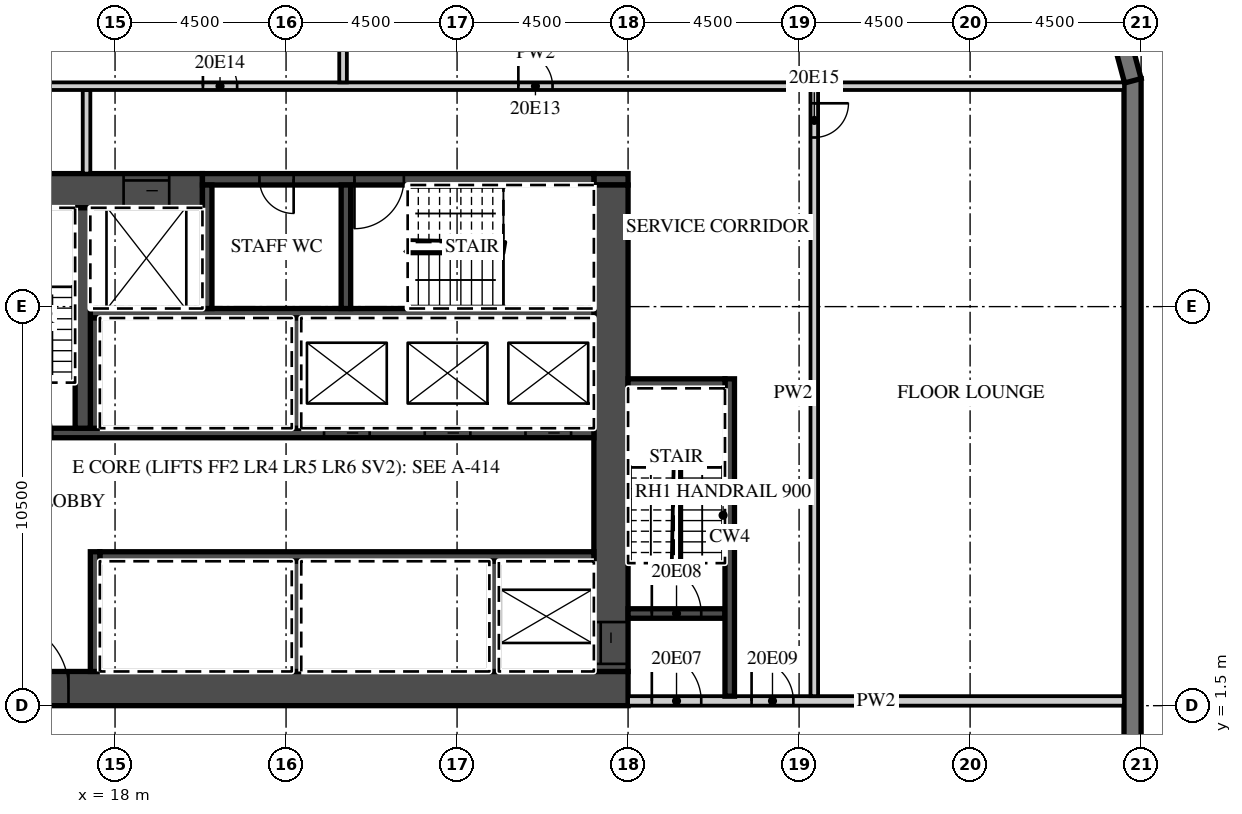
"""IFC4 building model, lengths in metres.
Left out: names, types, materials, properties, quantities, classifications, styles, units other than length and angle.
Written with IfcOpenShell. Run it as: python <this file> out.ifc"""

import sys

from ifc_helpers import new_model, si_unit, direction, frame, frame_2d, origin, place, context, subcontext, project, spatial, polyline, rectangle, outline, extrude, element, fill, save


model = new_model("IFC4")
c1 = context("Model", 3, precision=1e-05, world=origin(), true_north=direction((0.0, 1.0)))
c2 = subcontext(c1, "Body", "Model", "MODEL_VIEW")
j1 = project(units=[si_unit("LENGTHUNIT", "METRE"), si_unit("PLANEANGLEUNIT", "RADIAN")], contexts=[c1])
p1 = place(None, origin())
s1 = spatial("IfcSite", under=j1, at=p1, CompositionType="ELEMENT")
p2 = place(p1, origin())
s2 = spatial("IfcBuilding", under=s1, at=p2, CompositionType="ELEMENT")
p3 = place(p2, frame((0.0, 0.0, 96.3)))
s3 = spatial("IfcBuildingStorey", under=s2, at=p3, CompositionType="ELEMENT", Elevation=96.3)
p4 = place(p3, frame((44.775, -18.0, 0.0), z_axis=(0.0, 0.0, 1.0), x_axis=(0.0, 1.0, 0.0)))
e1 = element("IfcWall", 1, at=p4, inside=s3, PredefinedType="SOLIDWALL", context=c2, shape_type="SweptSolid", body=[
    extrude(rectangle(XDim=36.0, YDim=0.45, at=frame_2d((18.0, 0.0))), origin(), (0.0, 0.0, 1.0), 3.0),
])
p5 = place(p4, frame((3.9, 0.0, 0.45)))
e2 = element("IfcOpeningElement", 2, at=p5, cuts=e1, PredefinedType="OPENING", context=c2, shape_type="SweptSolid", body=[
    extrude(rectangle(XDim=3.3, YDim=2.25, at=frame_2d((1.65, 1.125))), frame((0.0, 0.235, 0.0), z_axis=(0.0, -1.0, 0.0), x_axis=(1.0, 0.0, 0.0)), (0.0, 0.0, 1.0), 0.47),
])
p6 = place(p4, frame((8.4, 0.0, 0.45)))
e3 = element("IfcOpeningElement", 3, at=p6, cuts=e1, PredefinedType="OPENING", context=c2, shape_type="SweptSolid", body=[
    extrude(rectangle(XDim=3.3, YDim=2.25, at=frame_2d((1.65, 1.125))), frame((0.0, 0.235, 0.0), z_axis=(0.0, -1.0, 0.0), x_axis=(1.0, 0.0, 0.0)), (0.0, 0.0, 1.0), 0.47),
])
p7 = place(p4, frame((12.9, 0.0, 0.45)))
e4 = element("IfcOpeningElement", 4, at=p7, cuts=e1, PredefinedType="OPENING", context=c2, shape_type="SweptSolid", body=[
    extrude(rectangle(XDim=3.3, YDim=2.25, at=frame_2d((1.65, 1.125))), frame((0.0, 0.235, 0.0), z_axis=(0.0, -1.0, 0.0), x_axis=(1.0, 0.0, 0.0)), (0.0, 0.0, 1.0), 0.47),
])
p8 = place(p3, frame((44.783, 17.942, 0.0), z_axis=(0.0, 0.0, 1.0), x_axis=(-0.25881466832, 0.965926999034, 0.0)))
e5 = element("IfcWall", 5, at=p8, inside=s3, PredefinedType="SOLIDWALL", context=c2, shape_type="SweptSolid", body=[
    extrude(outline(polyline([(0.0, -0.225), (2.071, -0.225), (1.95, 0.225), (0.121, 0.225), (0.0, -0.225)])), origin(), (0.0, 0.0, 1.0), 3.0),
])
p9 = place(p3, frame((13.5, 1.95, 0.0), z_axis=(0.0, 0.0, 1.0), x_axis=(1.0, 0.0, 0.0)))
e6 = element("IfcWall", 6, at=p9, inside=s3, PredefinedType="SHEAR", context=c2, shape_type="SweptSolid", body=[
    extrude(rectangle(XDim=18.0, YDim=0.9, at=frame_2d((9.0, 0.0))), origin(), (0.0, 0.0, 1.0), 3.0),
])
p10 = place(p9, frame((1.475, 0.0, 0.0)))
e7 = element("IfcOpeningElement", 7, at=p10, cuts=e6, PredefinedType="OPENING", context=c2, shape_type="SweptSolid", body=[
    extrude(rectangle(XDim=1.8, YDim=2.1, at=frame_2d((0.9, 1.05))), frame((0.0, 0.46, 0.0), z_axis=(0.0, -1.0, 0.0), x_axis=(1.0, 0.0, 0.0)), (0.0, 0.0, 1.0), 0.92),
])
p11 = place(p3, frame((13.5, 15.05, 0.0), z_axis=(0.0, 0.0, 1.0), x_axis=(1.0, 0.0, 0.0)))
e8 = element("IfcWall", 8, at=p11, inside=s3, PredefinedType="SHEAR", context=c2, shape_type="SweptSolid", body=[
    extrude(rectangle(XDim=6.8, YDim=0.9, at=frame_2d((3.4, 0.0))), origin(), (0.0, 0.0, 1.0), 3.0),
])
p12 = place(p11, frame((4.725, 0.0, 0.0)))
e9 = element("IfcOpeningElement", 9, at=p12, cuts=e8, PredefinedType="OPENING", context=c2, shape_type="SweptSolid", body=[
    extrude(rectangle(XDim=1.2, YDim=2.1, at=frame_2d((0.6, 1.05))), frame((0.0, 0.46, 0.0), z_axis=(0.0, -1.0, 0.0), x_axis=(1.0, 0.0, 0.0)), (0.0, 0.0, 1.0), 0.92),
])
p13 = place(p3, frame((30.6, 15.35, 0.0), z_axis=(0.0, 0.0, 1.0), x_axis=(1.0, 0.0, 0.0)))
e10 = element("IfcWall", 10, at=p13, inside=s3, PredefinedType="SHEAR", context=c2, shape_type="SweptSolid", body=[
    extrude(rectangle(XDim=0.9, YDim=0.3, at=frame_2d((0.45, 0.0))), origin(), (0.0, 0.0, 1.0), 3.0),
])
p14 = place(p3, frame((20.3, 15.35, 0.0), z_axis=(0.0, 0.0, 1.0), x_axis=(1.0, 0.0, 0.0)))
e11 = element("IfcWall", 11, at=p14, inside=s3, PredefinedType="SHEAR", context=c2, shape_type="SweptSolid", body=[
    extrude(rectangle(XDim=10.3, YDim=0.3, at=frame_2d((5.15, 0.0))), origin(), (0.0, 0.0, 1.0), 3.0),
])
p15 = place(p14, frame((4.0, 0.0, 0.0)))
e12 = element("IfcOpeningElement", 12, at=p15, cuts=e11, PredefinedType="OPENING", context=c2, shape_type="SweptSolid", body=[
    extrude(rectangle(XDim=1.3, YDim=2.1, at=frame_2d((0.65, 1.05))), frame((0.0, 0.16, 0.0), z_axis=(0.0, -1.0, 0.0), x_axis=(1.0, 0.0, 0.0)), (0.0, 0.0, 1.0), 0.32),
])
p16 = place(p14, frame((1.5, 0.0, 0.0)))
e13 = element("IfcOpeningElement", 13, at=p16, cuts=e11, PredefinedType="OPENING", context=c2, shape_type="SweptSolid", body=[
    extrude(rectangle(XDim=0.9, YDim=2.1, at=frame_2d((0.45, 1.05))), frame((0.0, 0.16, 0.0), z_axis=(0.0, -1.0, 0.0), x_axis=(1.0, 0.0, 0.0)), (0.0, 0.0, 1.0), 0.32),
])
p17 = place(p3, frame((31.05, 2.4, 0.0), z_axis=(0.0, 0.0, 1.0), x_axis=(0.0, 1.0, 0.0)))
e14 = element("IfcWall", 14, at=p17, inside=s3, PredefinedType="SHEAR", context=c2, shape_type="SweptSolid", body=[
    extrude(rectangle(XDim=12.8, YDim=0.9, at=frame_2d((6.4, 0.0))), origin(), (0.0, 0.0, 1.0), 3.0),
])
p18 = place(p17, frame((0.2, 0.0, 0.0)))
e15 = element("IfcOpeningElement", 15, at=p18, cuts=e14, PredefinedType="OPENING", context=c2, shape_type="SweptSolid", body=[
    extrude(rectangle(XDim=1.1, YDim=2.1, at=frame_2d((0.55, 1.05))), frame((0.0, 0.46, 0.0), z_axis=(0.0, -1.0, 0.0), x_axis=(1.0, 0.0, 0.0)), (0.0, 0.0, 1.0), 0.92),
])
p19 = place(p3, frame((17.6, 5.425, 0.0), z_axis=(0.0, 0.0, 1.0), x_axis=(1.0, 0.0, 0.0)))
e16 = element("IfcWall", 16, at=p19, inside=s3, PredefinedType="SHEAR", context=c2, shape_type="SweptSolid", body=[
    extrude(rectangle(XDim=13.0, YDim=0.25, at=frame_2d((6.5, 0.0))), origin(), (0.0, 0.0, 1.0), 3.0),
])
p20 = place(p3, frame((17.475, 2.4, 0.0), z_axis=(0.0, 0.0, 1.0), x_axis=(0.0, 1.0, 0.0)))
e17 = element("IfcWall", 17, at=p20, inside=s3, PredefinedType="SHEAR", context=c2, shape_type="SweptSolid", body=[
    extrude(rectangle(XDim=3.15, YDim=0.25, at=frame_2d((1.575, 0.0))), origin(), (0.0, 0.0, 1.0), 3.0),
])
for number, where, z_axis, x_axis in (
    (18, (27.975, 2.4, 0.0), (0.0, 0.0, 1.0), (0.0, 1.0, 0.0)),
    (19, (22.775, 2.4, 0.0), (0.0, 0.0, 1.0), (0.0, 1.0, 0.0)),
):
    element("IfcWall", number, at=place(p3, frame(where, z_axis=z_axis, x_axis=x_axis)), inside=s3, PredefinedType="SHEAR", context=c2, shape_type="SweptSolid", body=[
        extrude(rectangle(XDim=2.9, YDim=0.25, at=frame_2d((1.45, 0.0))), origin(), (0.0, 0.0, 1.0), 3.0),
    ])
p21 = place(p3, frame((14.4, 8.675, 0.0), z_axis=(0.0, 0.0, 1.0), x_axis=(1.0, 0.0, 0.0)))
e20 = element("IfcWall", 20, at=p21, inside=s3, PredefinedType="SHEAR", context=c2, shape_type="SweptSolid", body=[
    extrude(rectangle(XDim=16.2, YDim=0.25, at=frame_2d((8.1, 0.0))), origin(), (0.0, 0.0, 1.0), 3.0),
])
p22 = place(p21, frame((14.4, 0.0, 0.0)))
e21 = element("IfcOpeningElement", 21, at=p22, cuts=e20, PredefinedType="OPENING", context=c2, shape_type="SweptSolid", body=[
    extrude(rectangle(XDim=1.2, YDim=2.1, at=frame_2d((0.6, 1.05))), frame((0.0, 0.135, 0.0), z_axis=(0.0, -1.0, 0.0), x_axis=(1.0, 0.0, 0.0)), (0.0, 0.0, 1.0), 0.27),
])
p23 = place(p21, frame((11.75, 0.0, 0.0)))
e22 = element("IfcOpeningElement", 22, at=p23, cuts=e20, PredefinedType="OPENING", context=c2, shape_type="SweptSolid", body=[
    extrude(rectangle(XDim=1.2, YDim=2.1, at=frame_2d((0.6, 1.05))), frame((0.0, 0.135, 0.0), z_axis=(0.0, -1.0, 0.0), x_axis=(1.0, 0.0, 0.0)), (0.0, 0.0, 1.0), 0.27),
])
p24 = place(p21, frame((9.1, 0.0, 0.0)))
e23 = element("IfcOpeningElement", 23, at=p24, cuts=e20, PredefinedType="OPENING", context=c2, shape_type="SweptSolid", body=[
    extrude(rectangle(XDim=1.2, YDim=2.1, at=frame_2d((0.6, 1.05))), frame((0.0, 0.135, 0.0), z_axis=(0.0, -1.0, 0.0), x_axis=(1.0, 0.0, 0.0)), (0.0, 0.0, 1.0), 0.27),
])
p25 = place(p21, frame((0.65, 0.0, 0.0)))
e24 = element("IfcOpeningElement", 24, at=p25, cuts=e20, PredefinedType="OPENING", context=c2, shape_type="SweptSolid", body=[
    extrude(rectangle(XDim=1.3, YDim=2.1, at=frame_2d((0.65, 1.05))), frame((0.0, 0.135, 0.0), z_axis=(0.0, -1.0, 0.0), x_axis=(1.0, 0.0, 0.0)), (0.0, 0.0, 1.0), 0.27),
])
p26 = place(p3, frame((17.35, 11.825, 0.0), z_axis=(0.0, 0.0, 1.0), x_axis=(1.0, 0.0, 0.0)))
e25 = element("IfcWall", 25, at=p26, inside=s3, PredefinedType="SHEAR", context=c2, shape_type="SweptSolid", body=[
    extrude(rectangle(XDim=13.25, YDim=0.25, at=frame_2d((6.625, 0.0))), origin(), (0.0, 0.0, 1.0), 3.0),
])
for number, where, z_axis, x_axis in (
    (26, (17.475, 8.8, 0.0), (0.0, 0.0, 1.0), (0.0, 1.0, 0.0)),
    (27, (22.775, 8.8, 0.0), (0.0, 0.0, 1.0), (0.0, 1.0, 0.0)),
):
    element("IfcWall", number, at=place(p3, frame(where, z_axis=z_axis, x_axis=x_axis)), inside=s3, PredefinedType="SHEAR", context=c2, shape_type="SweptSolid", body=[
        extrude(rectangle(XDim=2.9, YDim=0.25, at=frame_2d((1.45, 0.0))), origin(), (0.0, 0.0, 1.0), 3.0),
    ])
p27 = place(p3, frame((17.15, 8.8, 0.0), z_axis=(0.0, 0.0, 1.0), x_axis=(0.0, 1.0, 0.0)))
e28 = element("IfcWall", 28, at=p27, inside=s3, PredefinedType="SHEAR", context=c2, shape_type="SweptSolid", body=[
    extrude(rectangle(XDim=5.8, YDim=0.4, at=frame_2d((2.9, 0.0))), origin(), (0.0, 0.0, 1.0), 3.0),
])
for number, where, z_axis, x_axis in (
    (29, (20.425, 11.95, 0.0), (0.0, 0.0, 1.0), (0.0, 1.0, 0.0)),
    (30, (24.075, 11.95, 0.0), (0.0, 0.0, 1.0), (0.0, 1.0, 0.0)),
):
    element("IfcWall", number, at=place(p3, frame(where, z_axis=z_axis, x_axis=x_axis)), inside=s3, PredefinedType="SHEAR", context=c2, shape_type="SweptSolid", body=[
        extrude(rectangle(XDim=3.25, YDim=0.25, at=frame_2d((1.625, 0.0))), origin(), (0.0, 0.0, 1.0), 3.0),
    ])
p28 = place(p3, frame((31.5, 1.625, 0.0), z_axis=(0.0, 0.0, 1.0), x_axis=(1.0, 0.0, 0.0)))
e31 = element("IfcWall", 31, at=p28, inside=s3, PredefinedType="PARTITIONING", context=c2, shape_type="SweptSolid", body=[
    extrude(rectangle(XDim=13.05, YDim=0.25, at=frame_2d((6.525, 0.0))), origin(), (0.0, 0.0, 1.0), 3.0),
])
p29 = place(p28, frame((0.625, 0.0, 0.0)))
e32 = element("IfcOpeningElement", 32, at=p29, cuts=e31, PredefinedType="OPENING", context=c2, shape_type="SweptSolid", body=[
    extrude(rectangle(XDim=1.3, YDim=2.1, at=frame_2d((0.65, 1.05))), frame((0.0, 0.135, 0.0), z_axis=(0.0, -1.0, 0.0), x_axis=(1.0, 0.0, 0.0)), (0.0, 0.0, 1.0), 0.27),
])
p30 = place(p28, frame((3.25, 0.0, 0.0)))
e33 = element("IfcOpeningElement", 33, at=p30, cuts=e31, PredefinedType="OPENING", context=c2, shape_type="SweptSolid", body=[
    extrude(rectangle(XDim=1.1, YDim=2.1, at=frame_2d((0.55, 1.05))), frame((0.0, 0.135, 0.0), z_axis=(0.0, -1.0, 0.0), x_axis=(1.0, 0.0, 0.0)), (0.0, 0.0, 1.0), 0.27),
])
p31 = place(p3, frame((31.5, 3.925, 0.0), z_axis=(0.0, 0.0, 1.0), x_axis=(1.0, 0.0, 0.0)))
e34 = element("IfcWall", 34, at=p31, inside=s3, PredefinedType="SHEAR", context=c2, shape_type="SweptSolid", body=[
    extrude(rectangle(XDim=2.55, YDim=0.25, at=frame_2d((1.275, 0.0))), origin(), (0.0, 0.0, 1.0), 3.0),
])
p32 = place(p31, frame((0.625, 0.0, 0.0)))
e35 = element("IfcOpeningElement", 35, at=p32, cuts=e34, PredefinedType="OPENING", context=c2, shape_type="SweptSolid", body=[
    extrude(rectangle(XDim=1.3, YDim=2.1, at=frame_2d((0.65, 1.05))), frame((0.0, 0.135, 0.0), z_axis=(0.0, -1.0, 0.0), x_axis=(1.0, 0.0, 0.0)), (0.0, 0.0, 1.0), 0.27),
])
p33 = place(p3, frame((34.175, 1.75, 0.0), z_axis=(0.0, 0.0, 1.0), x_axis=(0.0, 1.0, 0.0)))
e36 = element("IfcWall", 36, at=p33, inside=s3, PredefinedType="SHEAR", context=c2, shape_type="SweptSolid", body=[
    extrude(rectangle(XDim=8.35, YDim=0.25, at=frame_2d((4.175, 0.0))), origin(), (0.0, 0.0, 1.0), 3.0),
])
p34 = place(p3, frame((31.5, 9.975, 0.0), z_axis=(0.0, 0.0, 1.0), x_axis=(1.0, 0.0, 0.0)))
e37 = element("IfcWall", 37, at=p34, inside=s3, PredefinedType="SHEAR", context=c2, shape_type="SweptSolid", body=[
    extrude(rectangle(XDim=2.55, YDim=0.25, at=frame_2d((1.275, 0.0))), origin(), (0.0, 0.0, 1.0), 3.0),
])
p35 = place(p3, frame((17.25, 15.5, 0.0), z_axis=(0.0, 0.0, 1.0), x_axis=(0.0, 1.0, 0.0)))
e38 = element("IfcWall", 38, at=p35, inside=s3, PredefinedType="PARTITIONING", context=c2, shape_type="SweptSolid", body=[
    extrude(rectangle(XDim=2.2, YDim=0.2, at=frame_2d((1.1, 0.0))), origin(), (0.0, 0.0, 1.0), 3.0),
])
p36 = place(p3, frame((36.4, 1.75, 0.0), z_axis=(0.0, 0.0, 1.0), x_axis=(0.0, 1.0, 0.0)))
e39 = element("IfcWall", 39, at=p36, inside=s3, PredefinedType="PARTITIONING", context=c2, shape_type="SweptSolid", body=[
    extrude(rectangle(XDim=15.95, YDim=0.2, at=frame_2d((7.975, 0.0))), origin(), (0.0, 0.0, 1.0), 3.0),
])
p37 = place(p36, frame((14.7, 0.0, 0.0)))
e40 = element("IfcOpeningElement", 40, at=p37, cuts=e39, PredefinedType="OPENING", context=c2, shape_type="SweptSolid", body=[
    extrude(rectangle(XDim=0.9, YDim=2.1, at=frame_2d((0.45, 1.05))), frame((0.0, 0.11, 0.0), z_axis=(0.0, -1.0, 0.0), x_axis=(1.0, 0.0, 0.0)), (0.0, 0.0, 1.0), 0.22),
])
p38 = place(p3, frame((13.6, 17.8, 0.0), z_axis=(0.0, 0.0, 1.0), x_axis=(1.0, 0.0, 0.0)))
e41 = element("IfcWall", 41, at=p38, inside=s3, PredefinedType="PARTITIONING", context=c2, shape_type="SweptSolid", body=[
    extrude(rectangle(XDim=30.95, YDim=0.2, at=frame_2d((15.475, 0.0))), origin(), (0.0, 0.0, 1.0), 3.0),
])
p39 = place(p38, frame((15.012, 0.0, 0.0)))
e42 = element("IfcOpeningElement", 42, at=p39, cuts=e41, PredefinedType="OPENING", context=c2, shape_type="SweptSolid", body=[
    extrude(rectangle(XDim=0.9, YDim=2.1, at=frame_2d((0.45, 1.05))), frame((0.0, 0.11, 0.0), z_axis=(0.0, -1.0, 0.0), x_axis=(1.0, 0.0, 0.0)), (0.0, 0.0, 1.0), 0.22),
])
p40 = place(p38, frame((6.712, 0.0, 0.0)))
e43 = element("IfcOpeningElement", 43, at=p40, cuts=e41, PredefinedType="OPENING", context=c2, shape_type="SweptSolid", body=[
    extrude(rectangle(XDim=0.9, YDim=2.1, at=frame_2d((0.45, 1.05))), frame((0.0, 0.11, 0.0), z_axis=(0.0, -1.0, 0.0), x_axis=(1.0, 0.0, 0.0)), (0.0, 0.0, 1.0), 0.22),
])
p41 = place(p3, frame((24.0, 17.9, 0.0), z_axis=(0.0, 0.0, 1.0), x_axis=(0.0, 1.0, 0.0)))
e44 = element("IfcWall", 44, at=p41, inside=s3, PredefinedType="PARTITIONING", context=c2, shape_type="SweptSolid", body=[
    extrude(rectangle(XDim=3.65, YDim=0.2, at=frame_2d((1.825, 0.0))), origin(), (0.0, 0.0, 1.0), 3.0),
])
p42 = place(p22, origin())
e45 = element("IfcDoor", 45, at=p42, inside=s3, OperationType="SLIDING_TO_LEFT", PredefinedType="DOOR", context=c2, shape_type="SweptSolid", body=[
    extrude(rectangle(XDim=1.2, YDim=2.1, at=frame_2d((0.6, 1.05))), frame((0.0, 0.025, 0.0), z_axis=(0.0, -1.0, 0.0), x_axis=(1.0, 0.0, 0.0)), (0.0, 0.0, 1.0), 0.05),
])
fill(e21, e45)
p43 = place(p23, origin())
e46 = element("IfcDoor", 46, at=p43, inside=s3, OperationType="SLIDING_TO_RIGHT", PredefinedType="DOOR", context=c2, shape_type="SweptSolid", body=[
    extrude(rectangle(XDim=1.2, YDim=2.1, at=frame_2d((0.6, 1.05))), frame((0.0, 0.025, 0.0), z_axis=(0.0, -1.0, 0.0), x_axis=(1.0, 0.0, 0.0)), (0.0, 0.0, 1.0), 0.05),
])
fill(e22, e46)
p44 = place(p24, origin())
e47 = element("IfcDoor", 47, at=p44, inside=s3, OperationType="SLIDING_TO_RIGHT", PredefinedType="DOOR", context=c2, shape_type="SweptSolid", body=[
    extrude(rectangle(XDim=1.2, YDim=2.1, at=frame_2d((0.6, 1.05))), frame((0.0, 0.025, 0.0), z_axis=(0.0, -1.0, 0.0), x_axis=(1.0, 0.0, 0.0)), (0.0, 0.0, 1.0), 0.05),
])
fill(e23, e47)
p45 = place(p12, origin())
e48 = element("IfcDoor", 48, at=p45, inside=s3, OperationType="SLIDING_TO_LEFT", PredefinedType="DOOR", context=c2, shape_type="SweptSolid", body=[
    extrude(rectangle(XDim=1.2, YDim=2.1, at=frame_2d((0.6, 1.05))), frame((0.0, 0.025, 0.0), z_axis=(0.0, -1.0, 0.0), x_axis=(1.0, 0.0, 0.0)), (0.0, 0.0, 1.0), 0.05),
])
fill(e9, e48)
p46 = place(p18, origin())
e49 = element("IfcDoor", 49, at=p46, inside=s3, OperationType="SLIDING_TO_LEFT", PredefinedType="DOOR", context=c2, shape_type="SweptSolid", body=[
    extrude(rectangle(XDim=1.1, YDim=2.1, at=frame_2d((0.55, 1.05))), frame((0.0, 0.025, 0.0), z_axis=(0.0, -1.0, 0.0), x_axis=(1.0, 0.0, 0.0)), (0.0, 0.0, 1.0), 0.05),
])
fill(e15, e49)
p47 = place(p10, origin())
e50 = element("IfcDoor", 50, at=p47, inside=s3, OperationType="DOUBLE_DOOR_DOUBLE_SWING", PredefinedType="DOOR", context=c2, shape_type="SweptSolid", body=[
    extrude(rectangle(XDim=1.8, YDim=2.1, at=frame_2d((0.9, 1.05))), frame((0.0, 0.025, 0.0), z_axis=(0.0, -1.0, 0.0), x_axis=(1.0, 0.0, 0.0)), (0.0, 0.0, 1.0), 0.05),
])
fill(e7, e50)
p48 = place(p29, origin())
e51 = element("IfcDoor", 51, at=p48, inside=s3, OperationType="SINGLE_SWING_LEFT", PredefinedType="DOOR", context=c2, shape_type="SweptSolid", body=[
    extrude(rectangle(XDim=1.3, YDim=2.1, at=frame_2d((0.65, 1.05))), frame((0.0, 0.025, 0.0), z_axis=(0.0, -1.0, 0.0), x_axis=(1.0, 0.0, 0.0)), (0.0, 0.0, 1.0), 0.05),
])
fill(e32, e51)
p49 = place(p32, origin())
e52 = element("IfcDoor", 52, at=p49, inside=s3, OperationType="SINGLE_SWING_LEFT", PredefinedType="DOOR", context=c2, shape_type="SweptSolid", body=[
    extrude(rectangle(XDim=1.3, YDim=2.1, at=frame_2d((0.65, 1.05))), frame((0.0, 0.025, 0.0), z_axis=(0.0, -1.0, 0.0), x_axis=(1.0, 0.0, 0.0)), (0.0, 0.0, 1.0), 0.05),
])
fill(e35, e52)
p50 = place(p30, origin())
e53 = element("IfcDoor", 53, at=p50, inside=s3, OperationType="SINGLE_SWING_LEFT", PredefinedType="DOOR", context=c2, shape_type="SweptSolid", body=[
    extrude(rectangle(XDim=1.1, YDim=2.1, at=frame_2d((0.55, 1.05))), frame((0.0, 0.025, 0.0), z_axis=(0.0, -1.0, 0.0), x_axis=(1.0, 0.0, 0.0)), (0.0, 0.0, 1.0), 0.05),
])
fill(e33, e53)
p51 = place(p15, origin())
e54 = element("IfcDoor", 54, at=p51, inside=s3, OperationType="SINGLE_SWING_LEFT", PredefinedType="DOOR", context=c2, shape_type="SweptSolid", body=[
    extrude(rectangle(XDim=1.3, YDim=2.1, at=frame_2d((0.65, 1.05))), frame((0.0, 0.025, 0.0), z_axis=(0.0, -1.0, 0.0), x_axis=(1.0, 0.0, 0.0)), (0.0, 0.0, 1.0), 0.05),
])
fill(e12, e54)
p52 = place(p16, origin())
e55 = element("IfcDoor", 55, at=p52, inside=s3, OperationType="SINGLE_SWING_RIGHT", PredefinedType="DOOR", context=c2, shape_type="SweptSolid", body=[
    extrude(rectangle(XDim=0.9, YDim=2.1, at=frame_2d((0.45, 1.05))), frame((0.0, 0.025, 0.0), z_axis=(0.0, -1.0, 0.0), x_axis=(1.0, 0.0, 0.0)), (0.0, 0.0, 1.0), 0.05),
])
fill(e13, e55)
p53 = place(p39, origin())
e56 = element("IfcDoor", 56, at=p53, inside=s3, OperationType="SINGLE_SWING_LEFT", PredefinedType="DOOR", context=c2, shape_type="SweptSolid", body=[
    extrude(rectangle(XDim=0.9, YDim=2.1, at=frame_2d((0.45, 1.05))), frame((0.0, 0.025, 0.0), z_axis=(0.0, -1.0, 0.0), x_axis=(1.0, 0.0, 0.0)), (0.0, 0.0, 1.0), 0.05),
])
fill(e42, e56)
p54 = place(p40, origin())
e57 = element("IfcDoor", 57, at=p54, inside=s3, OperationType="SINGLE_SWING_LEFT", PredefinedType="DOOR", context=c2, shape_type="SweptSolid", body=[
    extrude(rectangle(XDim=0.9, YDim=2.1, at=frame_2d((0.45, 1.05))), frame((0.0, 0.025, 0.0), z_axis=(0.0, -1.0, 0.0), x_axis=(1.0, 0.0, 0.0)), (0.0, 0.0, 1.0), 0.05),
])
fill(e43, e57)
p55 = place(p37, origin())
e58 = element("IfcDoor", 58, at=p55, inside=s3, OperationType="SINGLE_SWING_RIGHT", PredefinedType="DOOR", context=c2, shape_type="SweptSolid", body=[
    extrude(rectangle(XDim=0.9, YDim=2.1, at=frame_2d((0.45, 1.05))), frame((0.0, 0.025, 0.0), z_axis=(0.0, -1.0, 0.0), x_axis=(1.0, 0.0, 0.0)), (0.0, 0.0, 1.0), 0.05),
])
fill(e40, e58)
save(model, sys.argv[1])
